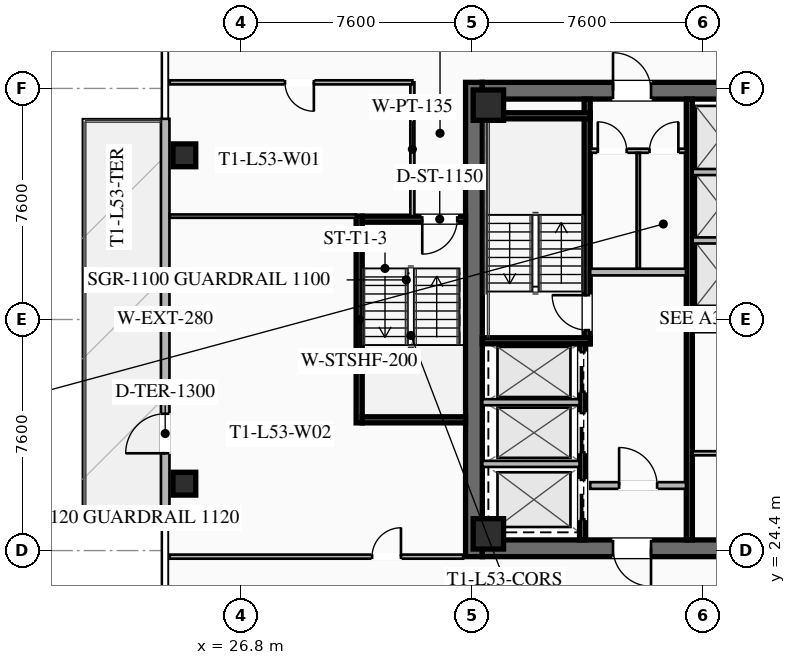
"""IFC4 building model, lengths in metres.
Left out: names, types, materials, properties, quantities, classifications, styles, units other than length and angle.
Written with IfcOpenShell. Run it as: python <this file> out.ifc"""

import sys

from ifc_helpers import new_model, si_unit, direction, frame, frame_2d, origin, origin_2d, place, context, subcontext, project, spatial, rectangle, hollow_rectangle, extrude, element, fill, save


model = new_model("IFC4")
c1 = context("Model", 3, precision=1e-05, world=origin(), true_north=direction((0.0, 1.0)))
c2 = subcontext(c1, "Body", "Model", "MODEL_VIEW")
j1 = project(units=[si_unit("LENGTHUNIT", "METRE"), si_unit("PLANEANGLEUNIT", "RADIAN")], contexts=[c1])
p1 = place(None, origin())
s1 = spatial("IfcSite", under=j1, at=p1, CompositionType="ELEMENT")
p2 = place(p1, origin())
s2 = spatial("IfcBuilding", under=s1, at=p2, CompositionType="ELEMENT")
p3 = place(p2, frame((0.0, 0.0, 196.05)))
s3 = spatial("IfcBuildingStorey", under=s2, at=p3, CompositionType="ELEMENT", Elevation=196.05)
p4 = place(p3, frame((34.475, 24.2, 0.0), z_axis=(0.0, 0.0, 1.0), x_axis=(0.0, 1.0, 0.0)))
e1 = element("IfcWall", 1, at=p4, inside=s3, PredefinedType="SHEAR", context=c2, shape_type="SweptSolid", body=[
    extrude(rectangle(XDim=15.6, YDim=0.55, at=frame_2d((7.8, 0.0))), origin(), (0.0, 0.0, 1.0), 3.55),
])
p5 = place(p3, frame((49.25, 24.475, 0.0), z_axis=(0.0, 0.0, 1.0), x_axis=(-1.0, 0.0, 0.0)))
e2 = element("IfcWall", 2, at=p5, inside=s3, PredefinedType="SHEAR", context=c2, shape_type="SweptSolid", body=[
    extrude(rectangle(XDim=14.5, YDim=0.55, at=frame_2d((7.25, 0.0))), origin(), (0.0, 0.0, 1.0), 3.55),
])
p6 = place(p5, frame((8.95, 0.0, 0.0)))
e3 = element("IfcOpeningElement", 3, at=p6, cuts=e2, PredefinedType="OPENING", context=c2, shape_type="SweptSolid", body=[
    extrude(rectangle(XDim=1.25, YDim=2.25, at=frame_2d((0.625, 1.125))), frame((0.0, 0.285, 0.0), z_axis=(0.0, -1.0, 0.0), x_axis=(1.0, 0.0, 0.0)), (0.0, 0.0, 1.0), 0.57),
])
p7 = place(p5, frame((3.9, 0.0, 0.0)))
e4 = element("IfcOpeningElement", 4, at=p7, cuts=e2, PredefinedType="OPENING", context=c2, shape_type="SweptSolid", body=[
    extrude(rectangle(XDim=1.25, YDim=2.25, at=frame_2d((0.625, 1.125))), frame((0.0, 0.285, 0.0), z_axis=(0.0, -1.0, 0.0), x_axis=(1.0, 0.0, 0.0)), (0.0, 0.0, 1.0), 0.57),
])
p8 = place(p3, frame((34.75, 39.525, 0.0), z_axis=(0.0, 0.0, 1.0), x_axis=(1.0, 0.0, 0.0)))
e5 = element("IfcWall", 5, at=p8, inside=s3, PredefinedType="SHEAR", context=c2, shape_type="SweptSolid", body=[
    extrude(rectangle(XDim=14.5, YDim=0.55, at=frame_2d((7.25, 0.0))), origin(), (0.0, 0.0, 1.0), 3.55),
])
p9 = place(p8, frame((4.3, 0.0, 0.0)))
e6 = element("IfcOpeningElement", 6, at=p9, cuts=e5, PredefinedType="OPENING", context=c2, shape_type="SweptSolid", body=[
    extrude(rectangle(XDim=1.25, YDim=2.25, at=frame_2d((0.625, 1.125))), frame((0.0, 0.285, 0.0), z_axis=(0.0, -1.0, 0.0), x_axis=(1.0, 0.0, 0.0)), (0.0, 0.0, 1.0), 0.57),
])
p10 = place(p8, frame((9.35, 0.0, 0.0)))
e7 = element("IfcOpeningElement", 7, at=p10, cuts=e5, PredefinedType="OPENING", context=c2, shape_type="SweptSolid", body=[
    extrude(rectangle(XDim=1.25, YDim=2.25, at=frame_2d((0.625, 1.125))), frame((0.0, 0.285, 0.0), z_axis=(0.0, -1.0, 0.0), x_axis=(1.0, 0.0, 0.0)), (0.0, 0.0, 1.0), 0.57),
])
for number, where, z_axis, x_axis in (
    (8, (34.95, 24.95, 0.0), (0.0, 0.0, 1.0), (1.0, 0.0, 0.0)),
    (9, (34.95, 39.05, 0.0), (0.0, 0.0, 1.0), (1.0, 0.0, 0.0)),
):
    element("IfcColumn", number, at=place(p3, frame(where, z_axis=z_axis, x_axis=x_axis)), inside=s3, PredefinedType="COLUMN", context=c2, shape_type="SweptSolid", body=[
        extrude(hollow_rectangle(XDim=1.0, YDim=1.0, WallThickness=0.04, at=origin_2d()), origin(), (0.0, 0.0, 1.0), 3.25),
    ])
for number, where, z_axis, x_axis in (
    (10, (24.95, 37.4, 0.0), (0.0, 0.0, 1.0), (1.0, 0.0, 0.0)),
    (11, (24.95, 26.6, 0.0), (0.0, 0.0, 1.0), (1.0, 0.0, 0.0)),
):
    element("IfcColumn", number, at=place(p3, frame(where, z_axis=z_axis, x_axis=x_axis)), inside=s3, PredefinedType="COLUMN", context=c2, shape_type="SweptSolid", body=[
        extrude(hollow_rectangle(XDim=0.75, YDim=0.75, WallThickness=0.032, at=origin_2d()), origin(), (0.0, 0.0, 1.0), 3.25),
    ])
p11 = place(p3, frame((24.32, 25.4, 0.0), z_axis=(0.0, 0.0, 1.0), x_axis=(0.0, 1.0, 0.0)))
e12 = element("IfcWall", 12, at=p11, inside=s3, PredefinedType="SOLIDWALL", context=c2, shape_type="SweptSolid", body=[
    extrude(rectangle(XDim=13.2, YDim=0.28, at=frame_2d((6.6, 0.0))), origin(), (0.0, 0.0, 1.0), 3.25),
])
p12 = place(p11, frame((2.2, 0.0, 0.0)))
e13 = element("IfcOpeningElement", 13, at=p12, cuts=e12, PredefinedType="OPENING", context=c2, shape_type="SweptSolid", body=[
    extrude(rectangle(XDim=1.3, YDim=2.15, at=frame_2d((0.65, 1.075))), frame((0.0, 0.15, 0.0), z_axis=(0.0, -1.0, 0.0), x_axis=(1.0, 0.0, 0.0)), (0.0, 0.0, 1.0), 0.3),
])
p13 = place(p3, frame((38.2, 31.2, 0.0), z_axis=(0.0, 0.0, 1.0), x_axis=(0.0, 1.0, 0.0)))
e14 = element("IfcWall", 14, at=p13, inside=s3, PredefinedType="SHEAR", context=c2, shape_type="SweptSolid", body=[
    extrude(rectangle(XDim=8.05, YDim=0.2, at=frame_2d((4.025, 0.0))), origin(), (0.0, 0.0, 1.0), 3.25),
])
p14 = place(p13, frame((0.45, 0.0, 0.0)))
e15 = element("IfcOpeningElement", 15, at=p14, cuts=e14, PredefinedType="OPENING", context=c2, shape_type="SweptSolid", body=[
    extrude(rectangle(XDim=1.15, YDim=2.2, at=frame_2d((0.575, 1.1))), frame((0.0, 0.11, 0.0), z_axis=(0.0, -1.0, 0.0), x_axis=(1.0, 0.0, 0.0)), (0.0, 0.0, 1.0), 0.22),
])
for number, where, z_axis, x_axis in (
    (16, (34.75, 31.3, 0.0), (0.0, 0.0, 1.0), (1.0, 0.0, 0.0)),
    (17, (34.75, 38.7, 0.0), (0.0, 0.0, 1.0), (1.0, 0.0, 0.0)),
):
    element("IfcWall", number, at=place(p3, frame(where, z_axis=z_axis, x_axis=x_axis)), inside=s3, PredefinedType="SHEAR", context=c2, shape_type="SweptSolid", body=[
        extrude(rectangle(XDim=3.55, YDim=0.2, at=frame_2d((1.775, 0.0))), origin(), (0.0, 0.0, 1.0), 3.25),
    ])
p15 = place(p3, frame((41.56, 24.75, 0.0), z_axis=(0.0, 0.0, 1.0), x_axis=(0.0, 1.0, 0.0)))
e18 = element("IfcWall", 18, at=p15, inside=s3, PredefinedType="SHEAR", context=c2, shape_type="SweptSolid", body=[
    extrude(rectangle(XDim=14.5, YDim=0.2, at=frame_2d((7.25, 0.0))), origin(), (0.0, 0.0, 1.0), 3.25),
])
p16 = place(p3, frame((38.3, 33.56, 0.0), z_axis=(0.0, 0.0, 1.0), x_axis=(1.0, 0.0, 0.0)))
e19 = element("IfcWall", 19, at=p16, inside=s3, PredefinedType="SOLIDWALL", context=c2, shape_type="SweptSolid", body=[
    extrude(rectangle(XDim=3.15, YDim=0.22, at=frame_2d((1.575, 0.0))), origin(), (0.0, 0.0, 1.0), 2.393),
])
p17 = place(p3, frame((38.3, 26.54, 0.0), z_axis=(0.0, 0.0, 1.0), x_axis=(1.0, 0.0, 0.0)))
e20 = element("IfcWall", 20, at=p17, inside=s3, PredefinedType="SOLIDWALL", context=c2, shape_type="SweptSolid", body=[
    extrude(rectangle(XDim=3.15, YDim=0.22, at=frame_2d((1.575, 0.0))), origin(), (0.0, 0.0, 1.0), 2.393),
])
p18 = place(p17, frame((0.95, 0.0, 0.0)))
e21 = element("IfcOpeningElement", 21, at=p18, cuts=e20, PredefinedType="OPENING", context=c2, shape_type="SweptSolid", body=[
    extrude(rectangle(XDim=1.25, YDim=2.25, at=frame_2d((0.625, 1.125))), frame((0.0, 0.12, 0.0), z_axis=(0.0, -1.0, 0.0), x_axis=(1.0, 0.0, 0.0)), (0.0, 0.0, 1.0), 0.24),
])
p19 = place(p3, frame((38.05, 24.75, 0.0), z_axis=(0.0, 0.0, 1.0), x_axis=(0.0, 1.0, 0.0)))
e22 = element("IfcWall", 22, at=p19, inside=s3, PredefinedType="SHEAR", context=c2, shape_type="SweptSolid", body=[
    extrude(rectangle(XDim=6.45, YDim=0.2, at=frame_2d((3.225, 0.0))), origin(), (0.0, 0.0, 1.0), 3.25),
])
p20 = place(p19, frame((4.875, 0.0, 0.0)))
e23 = element("IfcOpeningElement", 23, at=p20, cuts=e22, PredefinedType="OPENING", context=c2, shape_type="SweptSolid", body=[
    extrude(rectangle(XDim=1.3, YDim=2.25, at=frame_2d((0.65, 1.125))), frame((0.0, 0.11, 0.0), z_axis=(0.0, -1.0, 0.0), x_axis=(1.0, 0.0, 0.0)), (0.0, 0.0, 1.0), 0.22),
])
p21 = place(p19, frame((2.875, 0.0, 0.0)))
e24 = element("IfcOpeningElement", 24, at=p21, cuts=e22, PredefinedType="OPENING", context=c2, shape_type="SweptSolid", body=[
    extrude(rectangle(XDim=1.3, YDim=2.25, at=frame_2d((0.65, 1.125))), frame((0.0, 0.11, 0.0), z_axis=(0.0, -1.0, 0.0), x_axis=(1.0, 0.0, 0.0)), (0.0, 0.0, 1.0), 0.22),
])
p22 = place(p19, frame((0.675, 0.0, 0.0)))
e25 = element("IfcOpeningElement", 25, at=p22, cuts=e22, PredefinedType="OPENING", context=c2, shape_type="SweptSolid", body=[
    extrude(rectangle(XDim=1.3, YDim=2.25, at=frame_2d((0.65, 1.125))), frame((0.0, 0.11, 0.0), z_axis=(0.0, -1.0, 0.0), x_axis=(1.0, 0.0, 0.0)), (0.0, 0.0, 1.0), 0.22),
])
for number, where, z_axis, x_axis in (
    (26, (34.75, 27.25, 0.0), (0.0, 0.0, 1.0), (1.0, 0.0, 0.0)),
    (27, (34.75, 29.28, 0.0), (0.0, 0.0, 1.0), (1.0, 0.0, 0.0)),
):
    element("IfcWall", number, at=place(p3, frame(where, z_axis=z_axis, x_axis=x_axis)), inside=s3, PredefinedType="SOLIDWALL", context=c2, shape_type="SweptSolid", body=[
        extrude(rectangle(XDim=3.2, YDim=0.2, at=frame_2d((1.6, 0.0))), origin(), (0.0, 0.0, 1.0), 3.25),
    ])
p23 = place(p3, frame((38.3, 37.55, 0.0), z_axis=(0.0, 0.0, 1.0), x_axis=(1.0, 0.0, 0.0)))
e28 = element("IfcWall", 28, at=p23, inside=s3, PredefinedType="PARTITIONING", context=c2, shape_type="SweptSolid", body=[
    extrude(rectangle(XDim=3.15, YDim=0.135, at=frame_2d((1.575, 0.0))), origin(), (0.0, 0.0, 1.0), 2.393),
])
p24 = place(p23, frame((0.25, 0.0, 0.0)))
e29 = element("IfcOpeningElement", 29, at=p24, cuts=e28, PredefinedType="OPENING", context=c2, shape_type="SweptSolid", body=[
    extrude(rectangle(XDim=0.95, YDim=2.05, at=frame_2d((0.475, 1.025))), frame((0.0, 0.077, 0.0), z_axis=(0.0, -1.0, 0.0), x_axis=(1.0, 0.0, 0.0)), (0.0, 0.0, 1.0), 0.155),
])
p25 = place(p23, frame((1.95, 0.0, 0.0)))
e30 = element("IfcOpeningElement", 30, at=p25, cuts=e28, PredefinedType="OPENING", context=c2, shape_type="SweptSolid", body=[
    extrude(rectangle(XDim=0.95, YDim=2.05, at=frame_2d((0.475, 1.025))), frame((0.0, 0.077, 0.0), z_axis=(0.0, -1.0, 0.0), x_axis=(1.0, 0.0, 0.0)), (0.0, 0.0, 1.0), 0.155),
])
p26 = place(p3, frame((39.88, 33.68, 0.0), z_axis=(0.0, 0.0, 1.0), x_axis=(0.0, 1.0, 0.0)))
e31 = element("IfcWall", 31, at=p26, inside=s3, PredefinedType="PARTITIONING", context=c2, shape_type="SweptSolid", body=[
    extrude(rectangle(XDim=3.8, YDim=0.11, at=frame_2d((1.9, 0.0))), origin(), (0.0, 0.0, 1.0), 2.393),
])
for number, where, z_axis, x_axis in (
    (32, (41.67, 31.65, 0.0), (0.0, 0.0, 1.0), (1.0, 0.0, 0.0)),
    (33, (41.67, 27.6, 0.0), (0.0, 0.0, 1.0), (1.0, 0.0, 0.0)),
):
    element("IfcWall", number, at=place(p3, frame(where, z_axis=z_axis, x_axis=x_axis)), inside=s3, PredefinedType="PARTITIONING", context=c2, shape_type="SweptSolid", body=[
        extrude(rectangle(XDim=1.88, YDim=0.135, at=frame_2d((0.94, 0.0))), origin(), (0.0, 0.0, 1.0), 2.393),
    ])
for number, where, z_axis, x_axis in (
    (34, (41.67, 32.35, 0.0), (0.0, 0.0, 1.0), (1.0, 0.0, 0.0)),
    (35, (41.67, 34.6, 0.0), (0.0, 0.0, 1.0), (1.0, 0.0, 0.0)),
    (36, (41.67, 36.85, 0.0), (0.0, 0.0, 1.0), (1.0, 0.0, 0.0)),
):
    element("IfcWall", number, at=place(p3, frame(where, z_axis=z_axis, x_axis=x_axis)), inside=s3, PredefinedType="SOLIDWALL", context=c2, shape_type="SweptSolid", body=[
        extrude(rectangle(XDim=1.88, YDim=0.2, at=frame_2d((0.94, 0.0))), origin(), (0.0, 0.0, 1.0), 3.25),
    ])
p27 = place(p3, frame((30.7, 28.6, 0.0), z_axis=(0.0, 0.0, 1.0), x_axis=(0.0, 1.0, 0.0)))
e37 = element("IfcWall", 37, at=p27, inside=s3, PredefinedType="SHEAR", context=c2, shape_type="SweptSolid", body=[
    extrude(rectangle(XDim=6.8, YDim=0.2, at=frame_2d((3.4, 0.0))), origin(), (0.0, 0.0, 1.0), 3.25),
])
p28 = place(p3, frame((34.2, 35.3, 0.0), z_axis=(0.0, 0.0, 1.0), x_axis=(-1.0, 0.0, 0.0)))
e38 = element("IfcWall", 38, at=p28, inside=s3, PredefinedType="SHEAR", context=c2, shape_type="SweptSolid", body=[
    extrude(rectangle(XDim=3.4, YDim=0.2, at=frame_2d((1.7, 0.0))), origin(), (0.0, 0.0, 1.0), 3.25),
])
p29 = place(p28, frame((0.275, 0.0, 0.0)))
e39 = element("IfcOpeningElement", 39, at=p29, cuts=e38, PredefinedType="OPENING", context=c2, shape_type="SweptSolid", body=[
    extrude(rectangle(XDim=1.15, YDim=2.2, at=frame_2d((0.575, 1.1))), frame((0.0, 0.11, 0.0), z_axis=(0.0, -1.0, 0.0), x_axis=(1.0, 0.0, 0.0)), (0.0, 0.0, 1.0), 0.22),
])
p30 = place(p3, frame((30.8, 28.7, 0.0), z_axis=(0.0, 0.0, 1.0), x_axis=(1.0, 0.0, 0.0)))
e40 = element("IfcWall", 40, at=p30, inside=s3, PredefinedType="SHEAR", context=c2, shape_type="SweptSolid", body=[
    extrude(rectangle(XDim=3.4, YDim=0.2, at=frame_2d((1.7, 0.0))), origin(), (0.0, 0.0, 1.0), 3.25),
])
p31 = place(p3, frame((32.45, 35.4, 0.0), z_axis=(0.0, 0.0, 1.0), x_axis=(0.0, 1.0, 0.0)))
e41 = element("IfcWall", 41, at=p31, inside=s3, PredefinedType="PARTITIONING", context=c2, shape_type="SweptSolid", body=[
    extrude(rectangle(XDim=4.4, YDim=0.135, at=frame_2d((2.2, 0.0))), origin(), (0.0, 0.0, 1.0), 2.393),
])
p32 = place(p3, frame((32.45, 39.8, 0.0), z_axis=(0.0, 0.0, 1.0), x_axis=(-1.0, 0.0, 0.0)))
e42 = element("IfcWall", 42, at=p32, inside=s3, PredefinedType="PARTITIONING", context=c2, shape_type="SweptSolid", body=[
    extrude(rectangle(XDim=7.98, YDim=0.135, at=frame_2d((3.99, 0.0))), origin(), (0.0, 0.0, 1.0), 2.393),
])
p33 = place(p32, frame((3.24, 0.0, 0.0)))
e43 = element("IfcOpeningElement", 43, at=p33, cuts=e42, PredefinedType="OPENING", context=c2, shape_type="SweptSolid", body=[
    extrude(rectangle(XDim=0.95, YDim=2.05, at=frame_2d((0.475, 1.025))), frame((0.0, 0.077, 0.0), z_axis=(0.0, -1.0, 0.0), x_axis=(1.0, 0.0, 0.0)), (0.0, 0.0, 1.0), 0.155),
])
p34 = place(p3, frame((24.47, 24.2, 0.0), z_axis=(0.0, 0.0, 1.0), x_axis=(1.0, 0.0, 0.0)))
e44 = element("IfcWall", 44, at=p34, inside=s3, PredefinedType="PARTITIONING", context=c2, shape_type="SweptSolid", body=[
    extrude(rectangle(XDim=9.65, YDim=0.135, at=frame_2d((4.825, 0.0))), origin(), (0.0, 0.0, 1.0), 2.393),
])
p35 = place(p34, frame((6.655, 0.0, 0.0)))
e45 = element("IfcOpeningElement", 45, at=p35, cuts=e44, PredefinedType="OPENING", context=c2, shape_type="SweptSolid", body=[
    extrude(rectangle(XDim=0.95, YDim=2.05, at=frame_2d((0.475, 1.025))), frame((0.0, 0.077, 0.0), z_axis=(0.0, -1.0, 0.0), x_axis=(1.0, 0.0, 0.0)), (0.0, 0.0, 1.0), 0.155),
])
p36 = place(p3, frame((30.6, 35.4, 0.0), z_axis=(0.0, 0.0, 1.0), x_axis=(-1.0, 0.0, 0.0)))
e46 = element("IfcWall", 46, at=p36, inside=s3, PredefinedType="PARTITIONING", context=c2, shape_type="SweptSolid", body=[
    extrude(rectangle(XDim=6.13, YDim=0.11, at=frame_2d((3.065, 0.0))), origin(), (0.0, 0.0, 1.0), 2.393),
])
p37 = place(p12, origin())
e47 = element("IfcDoor", 47, at=p37, inside=s3, OperationType="SINGLE_SWING_LEFT", PredefinedType="DOOR", context=c2, shape_type="SweptSolid", body=[
    extrude(rectangle(XDim=1.3, YDim=2.15, at=frame_2d((0.65, 1.075))), frame((0.0, 0.025, 0.0), z_axis=(0.0, -1.0, 0.0), x_axis=(1.0, 0.0, 0.0)), (0.0, 0.0, 1.0), 0.05),
])
fill(e13, e47)
p38 = place(p9, origin())
e48 = element("IfcDoor", 48, at=p38, inside=s3, OperationType="SINGLE_SWING_LEFT", PredefinedType="DOOR", context=c2, shape_type="SweptSolid", body=[
    extrude(rectangle(XDim=1.25, YDim=2.25, at=frame_2d((0.625, 1.125))), frame((0.0, 0.025, 0.0), z_axis=(0.0, -1.0, 0.0), x_axis=(1.0, 0.0, 0.0)), (0.0, 0.0, 1.0), 0.05),
])
fill(e6, e48)
p39 = place(p6, origin())
e49 = element("IfcDoor", 49, at=p39, inside=s3, OperationType="SINGLE_SWING_LEFT", PredefinedType="DOOR", context=c2, shape_type="SweptSolid", body=[
    extrude(rectangle(XDim=1.25, YDim=2.25, at=frame_2d((0.625, 1.125))), frame((0.0, 0.025, 0.0), z_axis=(0.0, -1.0, 0.0), x_axis=(1.0, 0.0, 0.0)), (0.0, 0.0, 1.0), 0.05),
])
fill(e3, e49)
p40 = place(p14, origin())
e50 = element("IfcDoor", 50, at=p40, inside=s3, OperationType="SINGLE_SWING_RIGHT", PredefinedType="DOOR", context=c2, shape_type="SweptSolid", body=[
    extrude(rectangle(XDim=1.15, YDim=2.2, at=frame_2d((0.575, 1.1))), frame((0.0, 0.025, 0.0), z_axis=(0.0, -1.0, 0.0), x_axis=(1.0, 0.0, 0.0)), (0.0, 0.0, 1.0), 0.05),
])
fill(e15, e50)
p41 = place(p18, origin())
e51 = element("IfcDoor", 51, at=p41, inside=s3, OperationType="SINGLE_SWING_LEFT", PredefinedType="DOOR", context=c2, shape_type="SweptSolid", body=[
    extrude(rectangle(XDim=1.25, YDim=2.25, at=frame_2d((0.625, 1.125))), frame((0.0, 0.025, 0.0), z_axis=(0.0, -1.0, 0.0), x_axis=(1.0, 0.0, 0.0)), (0.0, 0.0, 1.0), 0.05),
])
fill(e21, e51)
p42 = place(p24, origin())
e52 = element("IfcDoor", 52, at=p42, inside=s3, OperationType="SINGLE_SWING_LEFT", PredefinedType="DOOR", context=c2, shape_type="SweptSolid", body=[
    extrude(rectangle(XDim=0.95, YDim=2.05, at=frame_2d((0.475, 1.025))), frame((0.0, 0.025, 0.0), z_axis=(0.0, -1.0, 0.0), x_axis=(1.0, 0.0, 0.0)), (0.0, 0.0, 1.0), 0.05),
])
fill(e29, e52)
p43 = place(p25, origin())
e53 = element("IfcDoor", 53, at=p43, inside=s3, OperationType="SINGLE_SWING_RIGHT", PredefinedType="DOOR", context=c2, shape_type="SweptSolid", body=[
    extrude(rectangle(XDim=0.95, YDim=2.05, at=frame_2d((0.475, 1.025))), frame((0.0, 0.025, 0.0), z_axis=(0.0, -1.0, 0.0), x_axis=(1.0, 0.0, 0.0)), (0.0, 0.0, 1.0), 0.05),
])
fill(e30, e53)
p44 = place(p29, origin())
e54 = element("IfcDoor", 54, at=p44, inside=s3, OperationType="SINGLE_SWING_RIGHT", PredefinedType="DOOR", context=c2, shape_type="SweptSolid", body=[
    extrude(rectangle(XDim=1.15, YDim=2.2, at=frame_2d((0.575, 1.1))), frame((0.0, 0.025, 0.0), z_axis=(0.0, -1.0, 0.0), x_axis=(1.0, 0.0, 0.0)), (0.0, 0.0, 1.0), 0.05),
])
fill(e39, e54)
p45 = place(p33, origin())
e55 = element("IfcDoor", 55, at=p45, inside=s3, OperationType="SINGLE_SWING_LEFT", PredefinedType="DOOR", context=c2, shape_type="SweptSolid", body=[
    extrude(rectangle(XDim=0.95, YDim=2.05, at=frame_2d((0.475, 1.025))), frame((0.0, 0.025, 0.0), z_axis=(0.0, -1.0, 0.0), x_axis=(1.0, 0.0, 0.0)), (0.0, 0.0, 1.0), 0.05),
])
fill(e43, e55)
p46 = place(p35, origin())
e56 = element("IfcDoor", 56, at=p46, inside=s3, OperationType="SINGLE_SWING_RIGHT", PredefinedType="DOOR", context=c2, shape_type="SweptSolid", body=[
    extrude(rectangle(XDim=0.95, YDim=2.05, at=frame_2d((0.475, 1.025))), frame((0.0, 0.025, 0.0), z_axis=(0.0, -1.0, 0.0), x_axis=(1.0, 0.0, 0.0)), (0.0, 0.0, 1.0), 0.05),
])
fill(e45, e56)
p47 = place(p20, origin())
e57 = element("IfcDoor", 57, at=p47, inside=s3, OperationType="SLIDING_TO_LEFT", PredefinedType="DOOR", context=c2, shape_type="SweptSolid", body=[
    extrude(rectangle(XDim=1.3, YDim=2.25, at=frame_2d((0.65, 1.125))), frame((0.0, 0.025, 0.0), z_axis=(0.0, -1.0, 0.0), x_axis=(1.0, 0.0, 0.0)), (0.0, 0.0, 1.0), 0.05),
])
fill(e23, e57)
p48 = place(p21, origin())
e58 = element("IfcDoor", 58, at=p48, inside=s3, OperationType="SLIDING_TO_LEFT", PredefinedType="DOOR", context=c2, shape_type="SweptSolid", body=[
    extrude(rectangle(XDim=1.3, YDim=2.25, at=frame_2d((0.65, 1.125))), frame((0.0, 0.025, 0.0), z_axis=(0.0, -1.0, 0.0), x_axis=(1.0, 0.0, 0.0)), (0.0, 0.0, 1.0), 0.05),
])
fill(e24, e58)
p49 = place(p22, origin())
e59 = element("IfcDoor", 59, at=p49, inside=s3, OperationType="SLIDING_TO_LEFT", PredefinedType="DOOR", context=c2, shape_type="SweptSolid", body=[
    extrude(rectangle(XDim=1.3, YDim=2.25, at=frame_2d((0.65, 1.125))), frame((0.0, 0.025, 0.0), z_axis=(0.0, -1.0, 0.0), x_axis=(1.0, 0.0, 0.0)), (0.0, 0.0, 1.0), 0.05),
])
fill(e25, e59)
save(model, sys.argv[1])
